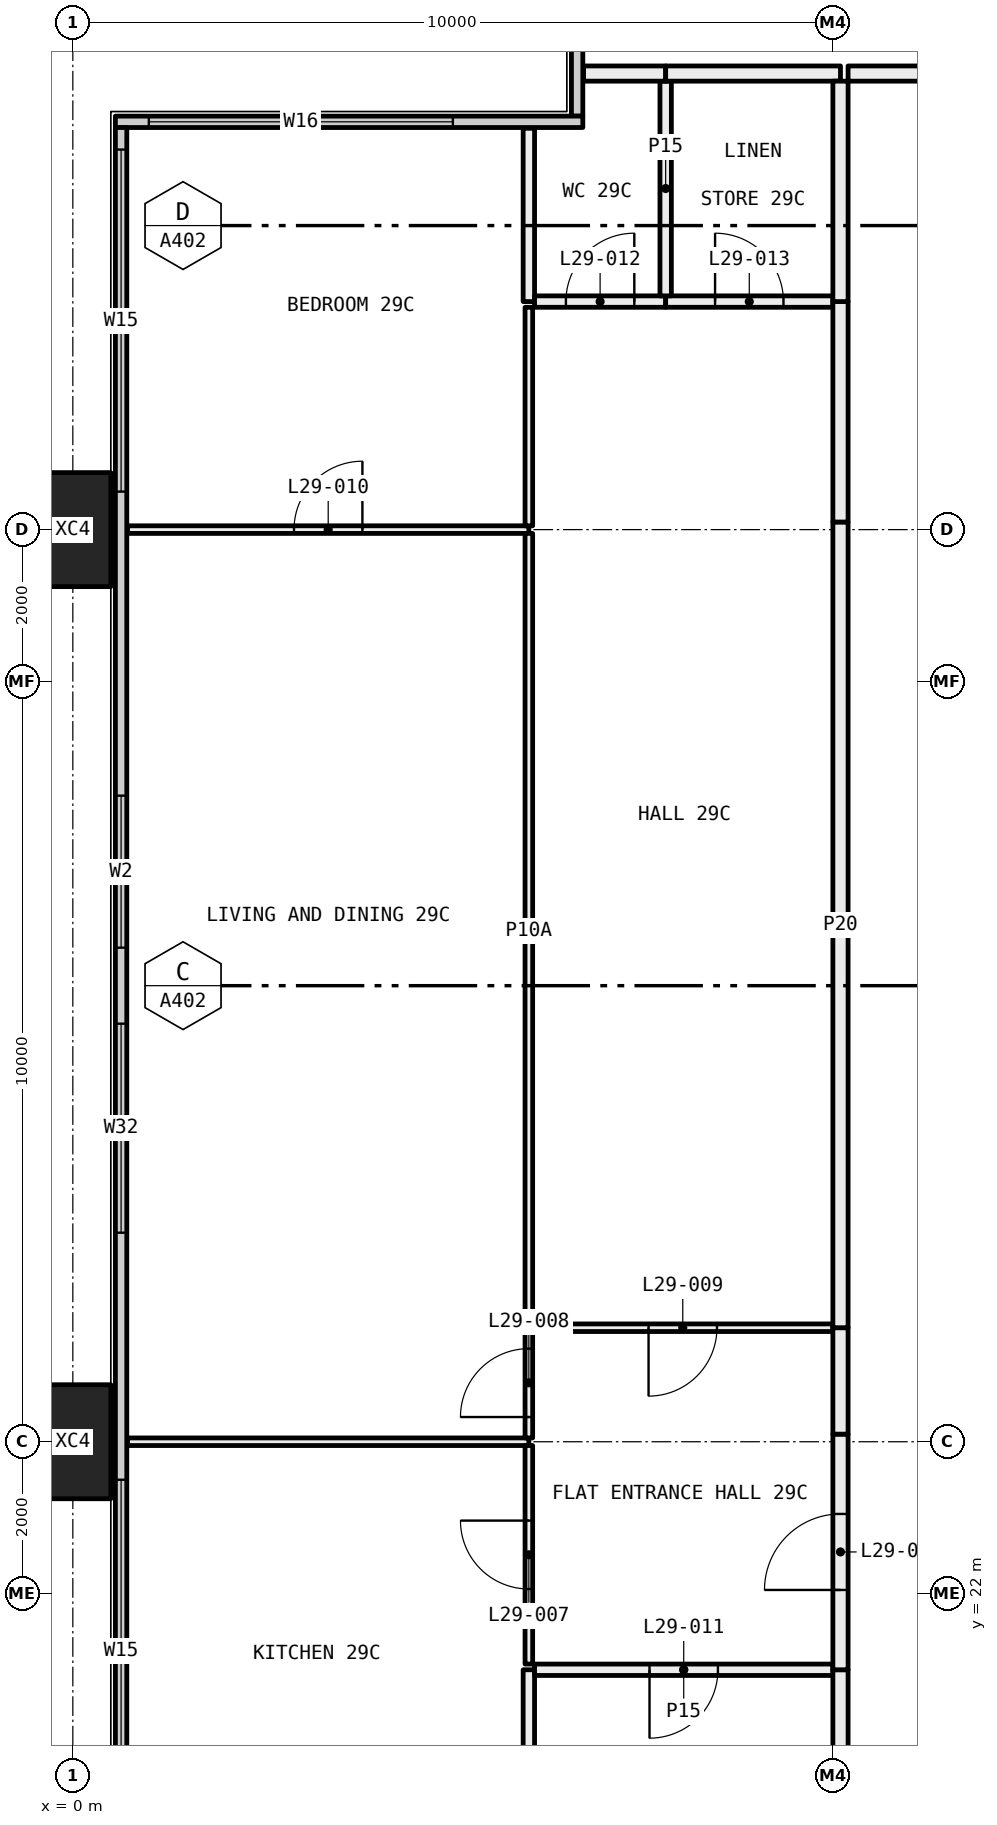
"""IFC4 building model, lengths in metres.
Left out: names, types, materials, properties, quantities, classifications, styles, units other than length and angle.
Written with IfcOpenShell. Run it as: python <this file> out.ifc"""

import sys

from ifc_helpers import new_model, si_unit, direction, frame, frame_2d, origin, origin_2d, place, context, subcontext, project, spatial, rectangle, hollow_rectangle, extrude, element, fill, save


model = new_model("IFC4")
c1 = context("Model", 3, precision=1e-05, world=origin(), true_north=direction((0.0, 1.0)))
c2 = subcontext(c1, "Body", "Model", "MODEL_VIEW")
j1 = project(units=[si_unit("LENGTHUNIT", "METRE"), si_unit("PLANEANGLEUNIT", "RADIAN")], contexts=[c1])
p1 = place(None, origin())
s1 = spatial("IfcSite", under=j1, at=p1, CompositionType="ELEMENT")
p2 = place(p1, origin())
s2 = spatial("IfcBuilding", under=s1, at=p2, CompositionType="ELEMENT")
p3 = place(p2, frame((0.0, 0.0, 113.85)))
s3 = spatial("IfcBuildingStorey", under=s2, at=p3, CompositionType="ELEMENT", Elevation=113.85)
for number, where, z_axis, x_axis in (
    (1, (0.0, 24.0, -0.4), (0.0, 0.0, 1.0), (0.0, 1.0, 0.0)),
    (2, (0.0, 36.0, -0.4), (0.0, 0.0, 1.0), (0.0, 1.0, 0.0)),
):
    element("IfcColumn", number, at=place(p3, frame(where, z_axis=z_axis, x_axis=x_axis)), inside=s3, PredefinedType="COLUMN", context=c2, shape_type="SweptSolid", body=[
        extrude(hollow_rectangle(XDim=1.5, YDim=1.0, WallThickness=0.06, at=origin_2d()), origin(), (0.0, 0.0, 1.0), 3.45),
    ])
p4 = place(p3, frame((6.635, 41.44, 0.0), z_axis=(0.0, 0.0, 1.0), x_axis=(0.0, 1.0, 0.0)))
e3 = element("IfcWall", 3, at=p4, inside=s3, PredefinedType="ELEMENTEDWALL", context=c2, shape_type="SweptSolid", body=[
    extrude(rectangle(XDim=5.85, YDim=0.15, at=frame_2d((2.925, 0.0))), origin(), (0.0, 0.0, 1.0), 3.05),
])
p5 = place(p4, frame((1.56, 0.0, 0.45)))
e4 = element("IfcOpeningElement", 4, at=p5, cuts=e3, PredefinedType="OPENING", context=c2, shape_type="SweptSolid", body=[
    extrude(rectangle(XDim=4.0, YDim=2.55, at=frame_2d((2.0, 1.275))), frame((0.0, 0.085, 0.0), z_axis=(0.0, -1.0, 0.0), x_axis=(1.0, 0.0, 0.0)), (0.0, 0.0, 1.0), 0.17),
])
p6 = place(p3, frame((0.56, 41.365, 0.0), z_axis=(0.0, 0.0, 1.0), x_axis=(1.0, 0.0, 0.0)))
e5 = element("IfcWall", 5, at=p6, inside=s3, PredefinedType="ELEMENTEDWALL", context=c2, shape_type="SweptSolid", body=[
    extrude(rectangle(XDim=6.15, YDim=0.15, at=frame_2d((3.075, 0.0))), origin(), (0.0, 0.0, 1.0), 3.05),
])
p7 = place(p6, frame((0.44, 0.0, 0.45)))
e6 = element("IfcOpeningElement", 6, at=p7, cuts=e5, PredefinedType="OPENING", context=c2, shape_type="SweptSolid", body=[
    extrude(rectangle(XDim=4.0, YDim=2.55, at=frame_2d((2.0, 1.275))), frame((0.0, 0.085, 0.0), z_axis=(0.0, -1.0, 0.0), x_axis=(1.0, 0.0, 0.0)), (0.0, 0.0, 1.0), 0.17),
])
p8 = place(p3, frame((0.635, 18.71, 0.0), z_axis=(0.0, 0.0, 1.0), x_axis=(0.0, 1.0, 0.0)))
e7 = element("IfcWall", 7, at=p8, inside=s3, PredefinedType="ELEMENTEDWALL", context=c2, shape_type="SweptSolid", body=[
    extrude(rectangle(XDim=22.58, YDim=0.15, at=frame_2d((11.29, 0.0))), origin(), (0.0, 0.0, 1.0), 3.05),
])
p9 = place(p8, frame((0.29, 0.0, 0.45)))
e8 = element("IfcOpeningElement", 8, at=p9, cuts=e7, PredefinedType="OPENING", context=c2, shape_type="SweptSolid", body=[
    extrude(rectangle(XDim=4.5, YDim=2.55, at=frame_2d((2.25, 1.275))), frame((0.0, 0.085, 0.0), z_axis=(0.0, -1.0, 0.0), x_axis=(1.0, 0.0, 0.0)), (0.0, 0.0, 1.0), 0.17),
])
p10 = place(p8, frame((8.04, 0.0, 0.45)))
e9 = element("IfcOpeningElement", 9, at=p10, cuts=e7, PredefinedType="OPENING", context=c2, shape_type="SweptSolid", body=[
    extrude(rectangle(XDim=2.75, YDim=2.55, at=frame_2d((1.375, 1.275))), frame((0.0, 0.085, 0.0), z_axis=(0.0, -1.0, 0.0), x_axis=(1.0, 0.0, 0.0)), (0.0, 0.0, 1.0), 0.17),
])
p11 = place(p8, frame((11.79, 0.0, 0.45)))
e10 = element("IfcOpeningElement", 10, at=p11, cuts=e7, PredefinedType="OPENING", context=c2, shape_type="SweptSolid", body=[
    extrude(rectangle(XDim=2.0, YDim=2.55, at=frame_2d((1.0, 1.275))), frame((0.0, 0.085, 0.0), z_axis=(0.0, -1.0, 0.0), x_axis=(1.0, 0.0, 0.0)), (0.0, 0.0, 1.0), 0.17),
])
p12 = place(p8, frame((17.79, 0.0, 0.45)))
e11 = element("IfcOpeningElement", 11, at=p12, cuts=e7, PredefinedType="OPENING", context=c2, shape_type="SweptSolid", body=[
    extrude(rectangle(XDim=4.5, YDim=2.55, at=frame_2d((2.25, 1.275))), frame((0.0, 0.085, 0.0), z_axis=(0.0, -1.0, 0.0), x_axis=(1.0, 0.0, 0.0)), (0.0, 0.0, 1.0), 0.17),
])
p13 = place(p3, frame((6.0, 24.0, 0.0), z_axis=(0.0, 0.0, 1.0), x_axis=(-1.0, 0.0, 0.0)))
e12 = element("IfcWall", 12, at=p13, inside=s3, PredefinedType="PARTITIONING", context=c2, shape_type="SweptSolid", body=[
    extrude(rectangle(XDim=5.28, YDim=0.1, at=frame_2d((2.64, 0.0))), origin(), (0.0, 0.0, 1.0), 2.45),
])
p14 = place(p3, frame((6.0, 18.72, 0.0), z_axis=(0.0, 0.0, 1.0), x_axis=(0.0, 1.0, 0.0)))
e13 = element("IfcWall", 13, at=p14, inside=s3, PredefinedType="PARTITIONING", context=c2, shape_type="SweptSolid", body=[
    extrude(rectangle(XDim=2.28, YDim=0.15, at=frame_2d((1.14, 0.0))), origin(), (0.0, 0.0, 1.0), 3.05),
])
p15 = place(p3, frame((6.0, 21.075, 0.0), z_axis=(0.0, 0.0, 1.0), x_axis=(0.0, 1.0, 0.0)))
e14 = element("IfcWall", 14, at=p15, inside=s3, PredefinedType="PARTITIONING", context=c2, shape_type="SweptSolid", body=[
    extrude(rectangle(XDim=2.875, YDim=0.1, at=frame_2d((1.438, 0.0))), origin(), (0.0, 0.0, 1.0), 2.45),
])
p16 = place(p15, frame((0.988, 0.0, 0.0)))
e15 = element("IfcOpeningElement", 15, at=p16, cuts=e14, PredefinedType="OPENING", context=c2, shape_type="SweptSolid", body=[
    extrude(rectangle(XDim=0.9, YDim=2.1, at=frame_2d((0.45, 1.05))), frame((0.0, 0.06, 0.0), z_axis=(0.0, -1.0, 0.0), x_axis=(1.0, 0.0, 0.0)), (0.0, 0.0, 1.0), 0.12),
])
p17 = place(p3, frame((6.0, 36.0, 0.0), z_axis=(0.0, 0.0, 1.0), x_axis=(-1.0, 0.0, 0.0)))
e16 = element("IfcWall", 16, at=p17, inside=s3, PredefinedType="PARTITIONING", context=c2, shape_type="SweptSolid", body=[
    extrude(rectangle(XDim=5.28, YDim=0.1, at=frame_2d((2.64, 0.0))), origin(), (0.0, 0.0, 1.0), 2.45),
])
p18 = place(p17, frame((2.19, 0.0, 0.0)))
e17 = element("IfcOpeningElement", 17, at=p18, cuts=e16, PredefinedType="OPENING", context=c2, shape_type="SweptSolid", body=[
    extrude(rectangle(XDim=0.9, YDim=2.1, at=frame_2d((0.45, 1.05))), frame((0.0, 0.06, 0.0), z_axis=(0.0, -1.0, 0.0), x_axis=(1.0, 0.0, 0.0)), (0.0, 0.0, 1.0), 0.12),
])
p19 = place(p3, frame((6.0, 24.05, 0.0), z_axis=(0.0, 0.0, 1.0), x_axis=(0.0, 1.0, 0.0)))
e18 = element("IfcWall", 18, at=p19, inside=s3, PredefinedType="PARTITIONING", context=c2, shape_type="SweptSolid", body=[
    extrude(rectangle(XDim=1.45, YDim=0.1, at=frame_2d((0.725, 0.0))), origin(), (0.0, 0.0, 1.0), 2.45),
])
p20 = place(p19, frame((0.275, 0.0, 0.0)))
e19 = element("IfcOpeningElement", 19, at=p20, cuts=e18, PredefinedType="OPENING", context=c2, shape_type="SweptSolid", body=[
    extrude(rectangle(XDim=0.9, YDim=2.1, at=frame_2d((0.45, 1.05))), frame((0.0, 0.06, 0.0), z_axis=(0.0, -1.0, 0.0), x_axis=(1.0, 0.0, 0.0)), (0.0, 0.0, 1.0), 0.12),
])
p21 = place(p3, frame((6.0, 25.5, 0.0), z_axis=(0.0, 0.0, 1.0), x_axis=(0.0, 1.0, 0.0)))
e20 = element("IfcWall", 20, at=p21, inside=s3, PredefinedType="PARTITIONING", context=c2, shape_type="SweptSolid", body=[
    extrude(rectangle(XDim=10.45, YDim=0.1, at=frame_2d((5.225, 0.0))), origin(), (0.0, 0.0, 1.0), 2.45),
])
p22 = place(p3, frame((6.0, 36.05, 0.0), z_axis=(0.0, 0.0, 1.0), x_axis=(0.0, 1.0, 0.0)))
e21 = element("IfcWall", 21, at=p22, inside=s3, PredefinedType="PARTITIONING", context=c2, shape_type="SweptSolid", body=[
    extrude(rectangle(XDim=2.875, YDim=0.1, at=frame_2d((1.438, 0.0))), origin(), (0.0, 0.0, 1.0), 2.45),
])
p23 = place(p3, frame((6.0, 39.0, 0.0), z_axis=(0.0, 0.0, 1.0), x_axis=(0.0, 1.0, 0.0)))
e22 = element("IfcWall", 22, at=p23, inside=s3, PredefinedType="PARTITIONING", context=c2, shape_type="SweptSolid", body=[
    extrude(rectangle(XDim=2.28, YDim=0.15, at=frame_2d((1.14, 0.0))), origin(), (0.0, 0.0, 1.0), 3.05),
])
p24 = place(p3, frame((10.0, 21.0, 0.0), z_axis=(0.0, 0.0, 1.0), x_axis=(-1.0, 0.0, 0.0)))
e23 = element("IfcWall", 23, at=p24, inside=s3, PredefinedType="PARTITIONING", context=c2, shape_type="SweptSolid", body=[
    extrude(rectangle(XDim=3.925, YDim=0.15, at=frame_2d((1.962, 0.0))), origin(), (0.0, 0.0, 1.0), 3.05),
])
p25 = place(p24, frame((1.512, 0.0, 0.0)))
e24 = element("IfcOpeningElement", 24, at=p25, cuts=e23, PredefinedType="OPENING", context=c2, shape_type="SweptSolid", body=[
    extrude(rectangle(XDim=0.9, YDim=2.1, at=frame_2d((0.45, 1.05))), frame((0.0, 0.085, 0.0), z_axis=(0.0, -1.0, 0.0), x_axis=(1.0, 0.0, 0.0)), (0.0, 0.0, 1.0), 0.17),
])
p26 = place(p3, frame((10.1, 18.1, 0.0), z_axis=(0.0, 0.0, 1.0), x_axis=(0.0, 1.0, 0.0)))
e25 = element("IfcWall", 25, at=p26, inside=s3, PredefinedType="PARTITIONING", context=c2, shape_type="SweptSolid", body=[
    extrude(rectangle(XDim=2.9, YDim=0.2, at=frame_2d((1.45, 0.0))), origin(), (0.0, 0.0, 1.0), 3.05),
])
p27 = place(p3, frame((10.0, 25.5, 0.0), z_axis=(0.0, 0.0, 1.0), x_axis=(-1.0, 0.0, 0.0)))
e26 = element("IfcWall", 26, at=p27, inside=s3, PredefinedType="PARTITIONING", context=c2, shape_type="SweptSolid", body=[
    extrude(rectangle(XDim=3.95, YDim=0.1, at=frame_2d((1.975, 0.0))), origin(), (0.0, 0.0, 1.0), 3.05),
])
p28 = place(p27, frame((1.525, 0.0, 0.0)))
e27 = element("IfcOpeningElement", 27, at=p28, cuts=e26, PredefinedType="OPENING", context=c2, shape_type="SweptSolid", body=[
    extrude(rectangle(XDim=0.9, YDim=2.1, at=frame_2d((0.45, 1.05))), frame((0.0, 0.06, 0.0), z_axis=(0.0, -1.0, 0.0), x_axis=(1.0, 0.0, 0.0)), (0.0, 0.0, 1.0), 0.12),
])
p29 = place(p3, frame((10.1, 21.0, 0.0), z_axis=(0.0, 0.0, 1.0), x_axis=(0.0, 1.0, 0.0)))
e28 = element("IfcWall", 28, at=p29, inside=s3, PredefinedType="PARTITIONING", context=c2, shape_type="SweptSolid", body=[
    extrude(rectangle(XDim=3.1, YDim=0.2, at=frame_2d((1.55, 0.0))), origin(), (0.0, 0.0, 1.0), 2.45),
])
p30 = place(p29, frame((1.05, 0.0, 0.0)))
e29 = element("IfcOpeningElement", 29, at=p30, cuts=e28, PredefinedType="OPENING", context=c2, shape_type="SweptSolid", body=[
    extrude(rectangle(XDim=1.0, YDim=2.1, at=frame_2d((0.5, 1.05))), frame((0.0, 0.11, 0.0), z_axis=(0.0, -1.0, 0.0), x_axis=(1.0, 0.0, 0.0)), (0.0, 0.0, 1.0), 0.22),
])
p31 = place(p3, frame((10.1, 24.1, 0.0), z_axis=(0.0, 0.0, 1.0), x_axis=(0.0, 1.0, 0.0)))
e30 = element("IfcWall", 30, at=p31, inside=s3, PredefinedType="PARTITIONING", context=c2, shape_type="SweptSolid", body=[
    extrude(rectangle(XDim=1.4, YDim=0.2, at=frame_2d((0.7, 0.0))), origin(), (0.0, 0.0, 1.0), 3.05),
])
p32 = place(p3, frame((7.8, 39.0, 0.0), z_axis=(0.0, 0.0, 1.0), x_axis=(-1.0, 0.0, 0.0)))
e31 = element("IfcWall", 31, at=p32, inside=s3, PredefinedType="PARTITIONING", context=c2, shape_type="SweptSolid", body=[
    extrude(rectangle(XDim=1.725, YDim=0.15, at=frame_2d((0.863, 0.0))), origin(), (0.0, 0.0, 1.0), 3.05),
])
p33 = place(p32, frame((0.413, 0.0, 0.0)))
e32 = element("IfcOpeningElement", 32, at=p33, cuts=e31, PredefinedType="OPENING", context=c2, shape_type="SweptSolid", body=[
    extrude(rectangle(XDim=0.9, YDim=2.1, at=frame_2d((0.45, 1.05))), frame((0.0, 0.085, 0.0), z_axis=(0.0, -1.0, 0.0), x_axis=(1.0, 0.0, 0.0)), (0.0, 0.0, 1.0), 0.17),
])
p34 = place(p3, frame((10.0, 39.0, 0.0), z_axis=(0.0, 0.0, 1.0), x_axis=(-1.0, 0.0, 0.0)))
e33 = element("IfcWall", 33, at=p34, inside=s3, PredefinedType="PARTITIONING", context=c2, shape_type="SweptSolid", body=[
    extrude(rectangle(XDim=2.2, YDim=0.15, at=frame_2d((1.1, 0.0))), origin(), (0.0, 0.0, 1.0), 3.05),
])
p35 = place(p34, frame((0.65, 0.0, 0.0)))
e34 = element("IfcOpeningElement", 34, at=p35, cuts=e33, PredefinedType="OPENING", context=c2, shape_type="SweptSolid", body=[
    extrude(rectangle(XDim=0.9, YDim=2.1, at=frame_2d((0.45, 1.05))), frame((0.0, 0.085, 0.0), z_axis=(0.0, -1.0, 0.0), x_axis=(1.0, 0.0, 0.0)), (0.0, 0.0, 1.0), 0.17),
])
p36 = place(p3, frame((10.1, 25.5, 0.0), z_axis=(0.0, 0.0, 1.0), x_axis=(0.0, 1.0, 0.0)))
e35 = element("IfcWall", 35, at=p36, inside=s3, PredefinedType="PARTITIONING", context=c2, shape_type="SweptSolid", body=[
    extrude(rectangle(XDim=10.6, YDim=0.2, at=frame_2d((5.3, 0.0))), origin(), (0.0, 0.0, 1.0), 2.45),
])
p37 = place(p3, frame((10.1, 36.1, 0.0), z_axis=(0.0, 0.0, 1.0), x_axis=(0.0, 1.0, 0.0)))
e36 = element("IfcWall", 36, at=p37, inside=s3, PredefinedType="PARTITIONING", context=c2, shape_type="SweptSolid", body=[
    extrude(rectangle(XDim=2.9, YDim=0.2, at=frame_2d((1.45, 0.0))), origin(), (0.0, 0.0, 1.0), 3.05),
])
p38 = place(p3, frame((7.8, 39.075, 0.0), z_axis=(0.0, 0.0, 1.0), x_axis=(0.0, 1.0, 0.0)))
e37 = element("IfcWall", 37, at=p38, inside=s3, PredefinedType="PARTITIONING", context=c2, shape_type="SweptSolid", body=[
    extrude(rectangle(XDim=2.825, YDim=0.15, at=frame_2d((1.413, 0.0))), origin(), (0.0, 0.0, 1.0), 3.05),
])
p39 = place(p3, frame((7.8, 42.0, 0.0), z_axis=(0.0, 0.0, 1.0), x_axis=(-1.0, 0.0, 0.0)))
e38 = element("IfcWall", 38, at=p39, inside=s3, PredefinedType="PARTITIONING", context=c2, shape_type="SweptSolid", body=[
    extrude(rectangle(XDim=1.08, YDim=0.2, at=frame_2d((0.54, 0.0))), origin(), (0.0, 0.0, 1.0), 3.05),
])
p40 = place(p3, frame((10.1, 42.0, 0.0), z_axis=(0.0, 0.0, 1.0), x_axis=(-1.0, 0.0, 0.0)))
e39 = element("IfcWall", 39, at=p40, inside=s3, PredefinedType="PARTITIONING", context=c2, shape_type="SweptSolid", body=[
    extrude(rectangle(XDim=2.3, YDim=0.2, at=frame_2d((1.15, 0.0))), origin(), (0.0, 0.0, 1.0), 3.05),
])
p41 = place(p3, frame((10.1, 39.0, 0.0), z_axis=(0.0, 0.0, 1.0), x_axis=(0.0, 1.0, 0.0)))
e40 = element("IfcWall", 40, at=p41, inside=s3, PredefinedType="PARTITIONING", context=c2, shape_type="SweptSolid", body=[
    extrude(rectangle(XDim=2.9, YDim=0.2, at=frame_2d((1.45, 0.0))), origin(), (0.0, 0.0, 1.0), 3.05),
])
p42 = place(p3, frame((10.2, 42.0, 0.0), z_axis=(0.0, 0.0, 1.0), x_axis=(1.0, 0.0, 0.0)))
e41 = element("IfcWall", 41, at=p42, inside=s3, PredefinedType="PARTITIONING", context=c2, shape_type="SweptSolid", body=[
    extrude(rectangle(XDim=1.8, YDim=0.2, at=frame_2d((0.9, 0.0))), origin(), (0.0, 0.0, 1.0), 3.05),
])
p43 = place(p7, origin())
e42 = element("IfcWindow", 42, at=p43, inside=s3, PartitioningType="SINGLE_PANEL", PredefinedType="WINDOW", context=c2, shape_type="SweptSolid", body=[
    extrude(rectangle(XDim=4.0, YDim=2.55, at=frame_2d((2.0, 1.275))), frame((0.0, 0.03, 0.0), z_axis=(0.0, -1.0, 0.0), x_axis=(1.0, 0.0, 0.0)), (0.0, 0.0, 1.0), 0.06),
])
fill(e6, e42)
p44 = place(p9, origin())
e43 = element("IfcWindow", 43, at=p44, inside=s3, PartitioningType="SINGLE_PANEL", PredefinedType="WINDOW", context=c2, shape_type="SweptSolid", body=[
    extrude(rectangle(XDim=4.5, YDim=2.55, at=frame_2d((2.25, 1.275))), frame((0.0, 0.03, 0.0), z_axis=(0.0, -1.0, 0.0), x_axis=(1.0, 0.0, 0.0)), (0.0, 0.0, 1.0), 0.06),
])
fill(e8, e43)
p45 = place(p10, origin())
e44 = element("IfcWindow", 44, at=p45, inside=s3, PartitioningType="SINGLE_PANEL", PredefinedType="WINDOW", context=c2, shape_type="SweptSolid", body=[
    extrude(rectangle(XDim=2.75, YDim=2.55, at=frame_2d((1.375, 1.275))), frame((0.0, 0.03, 0.0), z_axis=(0.0, -1.0, 0.0), x_axis=(1.0, 0.0, 0.0)), (0.0, 0.0, 1.0), 0.06),
])
fill(e9, e44)
p46 = place(p11, origin())
e45 = element("IfcWindow", 45, at=p46, inside=s3, PartitioningType="SINGLE_PANEL", PredefinedType="WINDOW", context=c2, shape_type="SweptSolid", body=[
    extrude(rectangle(XDim=2.0, YDim=2.55, at=frame_2d((1.0, 1.275))), frame((0.0, 0.03, 0.0), z_axis=(0.0, -1.0, 0.0), x_axis=(1.0, 0.0, 0.0)), (0.0, 0.0, 1.0), 0.06),
])
fill(e10, e45)
p47 = place(p12, origin())
e46 = element("IfcWindow", 46, at=p47, inside=s3, PartitioningType="SINGLE_PANEL", PredefinedType="WINDOW", context=c2, shape_type="SweptSolid", body=[
    extrude(rectangle(XDim=4.5, YDim=2.55, at=frame_2d((2.25, 1.275))), frame((0.0, 0.03, 0.0), z_axis=(0.0, -1.0, 0.0), x_axis=(1.0, 0.0, 0.0)), (0.0, 0.0, 1.0), 0.06),
])
fill(e11, e46)
p48 = place(p30, origin())
e47 = element("IfcDoor", 47, at=p48, inside=s3, OperationType="SINGLE_SWING_RIGHT", PredefinedType="DOOR", context=c2, shape_type="SweptSolid", body=[
    extrude(rectangle(XDim=1.0, YDim=2.1, at=frame_2d((0.5, 1.05))), frame((0.0, 0.025, 0.0), z_axis=(0.0, -1.0, 0.0), x_axis=(1.0, 0.0, 0.0)), (0.0, 0.0, 1.0), 0.05),
])
fill(e29, e47)
p49 = place(p16, origin())
e48 = element("IfcDoor", 48, at=p49, inside=s3, OperationType="SINGLE_SWING_LEFT", PredefinedType="DOOR", context=c2, shape_type="SweptSolid", body=[
    extrude(rectangle(XDim=0.9, YDim=2.1, at=frame_2d((0.45, 1.05))), frame((0.0, 0.025, 0.0), z_axis=(0.0, -1.0, 0.0), x_axis=(1.0, 0.0, 0.0)), (0.0, 0.0, 1.0), 0.05),
])
fill(e15, e48)
p50 = place(p20, origin())
e49 = element("IfcDoor", 49, at=p50, inside=s3, OperationType="SINGLE_SWING_RIGHT", PredefinedType="DOOR", context=c2, shape_type="SweptSolid", body=[
    extrude(rectangle(XDim=0.9, YDim=2.1, at=frame_2d((0.45, 1.05))), frame((0.0, 0.025, 0.0), z_axis=(0.0, -1.0, 0.0), x_axis=(1.0, 0.0, 0.0)), (0.0, 0.0, 1.0), 0.05),
])
fill(e19, e49)
p51 = place(p28, origin())
e50 = element("IfcDoor", 50, at=p51, inside=s3, OperationType="SINGLE_SWING_LEFT", PredefinedType="DOOR", context=c2, shape_type="SweptSolid", body=[
    extrude(rectangle(XDim=0.9, YDim=2.1, at=frame_2d((0.45, 1.05))), frame((0.0, 0.025, 0.0), z_axis=(0.0, -1.0, 0.0), x_axis=(1.0, 0.0, 0.0)), (0.0, 0.0, 1.0), 0.05),
])
fill(e27, e50)
p52 = place(p18, frame((0.9, 0.0, 0.0), x_axis=(-1.0, 0.0, 0.0)))
e51 = element("IfcDoor", 51, at=p52, inside=s3, OperationType="SINGLE_SWING_LEFT", PredefinedType="DOOR", context=c2, shape_type="SweptSolid", body=[
    extrude(rectangle(XDim=0.9, YDim=2.1, at=frame_2d((0.45, 1.05))), frame((0.0, 0.025, 0.0), z_axis=(0.0, -1.0, 0.0), x_axis=(1.0, 0.0, 0.0)), (0.0, 0.0, 1.0), 0.05),
])
fill(e17, e51)
p53 = place(p25, origin())
e52 = element("IfcDoor", 52, at=p53, inside=s3, OperationType="SINGLE_SWING_LEFT", PredefinedType="DOOR", context=c2, shape_type="SweptSolid", body=[
    extrude(rectangle(XDim=0.9, YDim=2.1, at=frame_2d((0.45, 1.05))), frame((0.0, 0.025, 0.0), z_axis=(0.0, -1.0, 0.0), x_axis=(1.0, 0.0, 0.0)), (0.0, 0.0, 1.0), 0.05),
])
fill(e24, e52)
p54 = place(p33, frame((0.9, 0.0, 0.0), x_axis=(-1.0, 0.0, 0.0)))
e53 = element("IfcDoor", 53, at=p54, inside=s3, OperationType="SINGLE_SWING_LEFT", PredefinedType="DOOR", context=c2, shape_type="SweptSolid", body=[
    extrude(rectangle(XDim=0.9, YDim=2.1, at=frame_2d((0.45, 1.05))), frame((0.0, 0.025, 0.0), z_axis=(0.0, -1.0, 0.0), x_axis=(1.0, 0.0, 0.0)), (0.0, 0.0, 1.0), 0.05),
])
fill(e32, e53)
p55 = place(p35, frame((0.9, 0.0, 0.0), x_axis=(-1.0, 0.0, 0.0)))
e54 = element("IfcDoor", 54, at=p55, inside=s3, OperationType="SINGLE_SWING_RIGHT", PredefinedType="DOOR", context=c2, shape_type="SweptSolid", body=[
    extrude(rectangle(XDim=0.9, YDim=2.1, at=frame_2d((0.45, 1.05))), frame((0.0, 0.025, 0.0), z_axis=(0.0, -1.0, 0.0), x_axis=(1.0, 0.0, 0.0)), (0.0, 0.0, 1.0), 0.05),
])
fill(e34, e54)
save(model, sys.argv[1])
